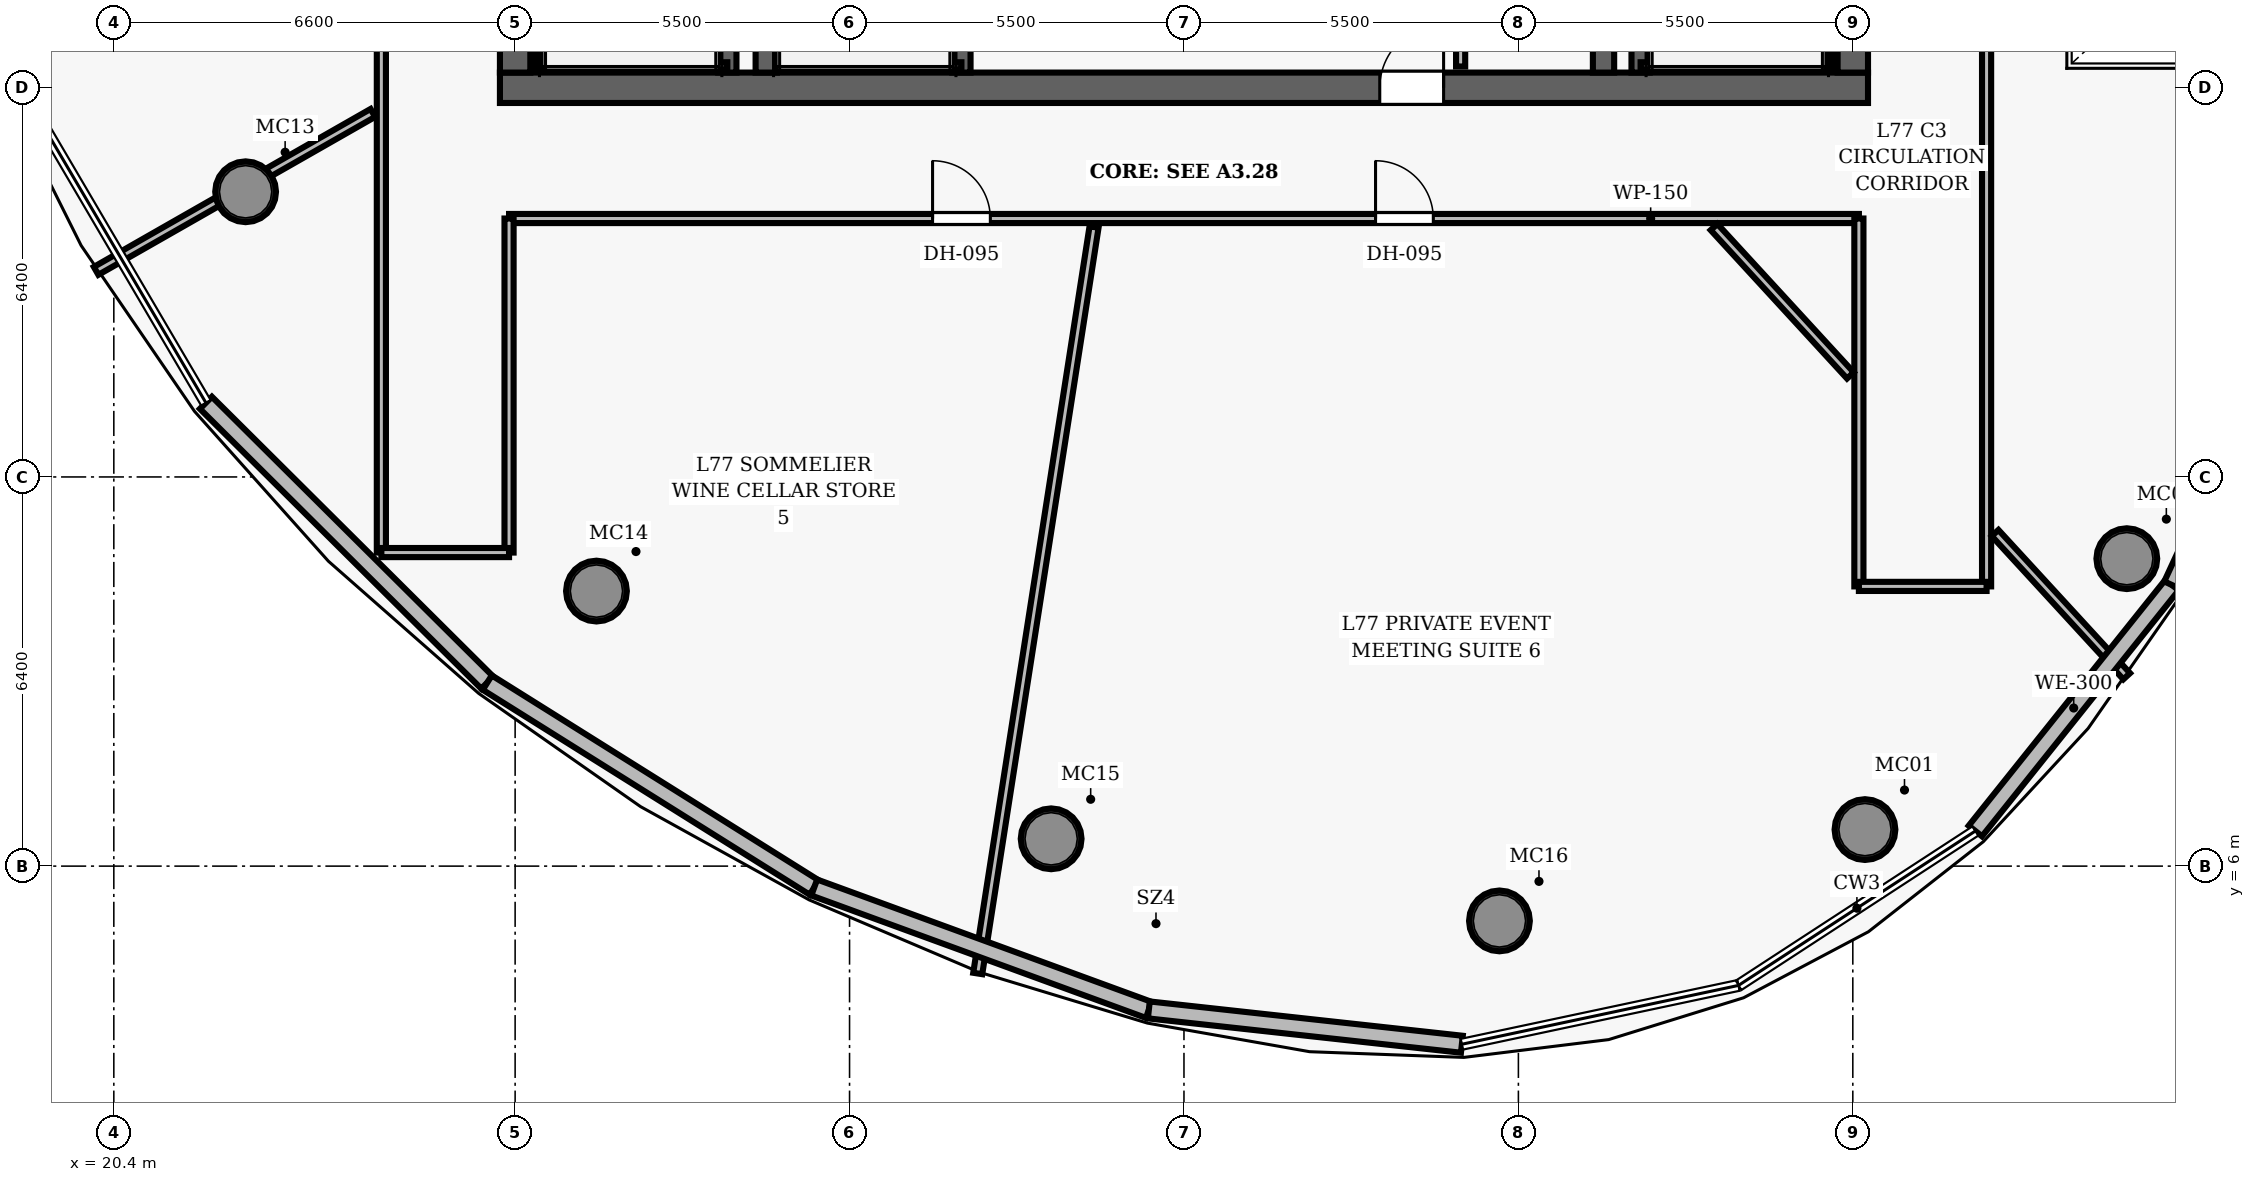
"""IFC4 building model, lengths in metres.
Left out: names, types, materials, properties, quantities, classifications, styles, units other than length and angle.
Written with IfcOpenShell. Run it as: python <this file> out.ifc"""

import sys

from ifc_helpers import new_model, si_unit, direction, frame, frame_2d, origin, origin_2d, place, context, subcontext, project, spatial, rectangle, hollow_circle, extrude, element, fill, save


model = new_model("IFC4")
c1 = context("Model", 3, precision=1e-05, world=origin(), true_north=direction((0.0, 1.0)))
c2 = subcontext(c1, "Body", "Model", "MODEL_VIEW")
j1 = project(units=[si_unit("LENGTHUNIT", "METRE"), si_unit("PLANEANGLEUNIT", "RADIAN")], contexts=[c1])
p1 = place(None, origin())
s1 = spatial("IfcSite", under=j1, at=p1, CompositionType="ELEMENT")
p2 = place(p1, origin())
s2 = spatial("IfcBuilding", under=s1, at=p2, CompositionType="ELEMENT")
p3 = place(p2, frame((0.0, 0.0, 303.65)))
s3 = spatial("IfcBuildingStorey", under=s2, at=p3, CompositionType="ELEMENT", Elevation=303.65)
p4 = place(p3, frame((26.75, 18.8, 0.0), z_axis=(0.0, 0.0, 1.0), x_axis=(1.0, 0.0, 0.0)))
e1 = element("IfcWall", 1, at=p4, inside=s3, PredefinedType="SHEAR", context=c2, shape_type="SweptSolid", body=[
    extrude(rectangle(XDim=22.5, YDim=0.5, at=frame_2d((11.25, 0.0))), origin(), (0.0, 0.0, 1.0), 3.85),
])
p5 = place(p4, frame((14.47, 0.0, 0.0)))
e2 = element("IfcOpeningElement", 2, at=p5, cuts=e1, PredefinedType="OPENING", context=c2, shape_type="SweptSolid", body=[
    extrude(rectangle(XDim=1.05, YDim=2.15, at=frame_2d((0.525, 1.075))), frame((0.0, 0.26, 0.0), z_axis=(0.0, -1.0, 0.0), x_axis=(1.0, 0.0, 0.0)), (0.0, 0.0, 1.0), 0.52),
])
p6 = place(p3, frame((27.0, 19.05, 0.0), z_axis=(0.0, 0.0, 1.0), x_axis=(0.0, 1.0, 0.0)))
e3 = element("IfcWall", 3, at=p6, inside=s3, PredefinedType="SHEAR", context=c2, shape_type="SweptSolid", body=[
    extrude(rectangle(XDim=13.9, YDim=0.5, at=frame_2d((6.95, 0.0))), origin(), (0.0, 0.0, 1.0), 3.85),
])
p7 = place(p6, frame((8.2, 0.0, 0.0)))
e4 = element("IfcOpeningElement", 4, at=p7, cuts=e3, PredefinedType="OPENING", context=c2, shape_type="SweptSolid", body=[
    extrude(rectangle(XDim=1.05, YDim=2.15, at=frame_2d((0.525, 1.075))), frame((0.0, 0.26, 0.0), z_axis=(0.0, -1.0, 0.0), x_axis=(1.0, 0.0, 0.0)), (0.0, 0.0, 1.0), 0.52),
])
p8 = place(p3, frame((49.0, 19.05, 0.0), z_axis=(0.0, 0.0, 1.0), x_axis=(0.0, 1.0, 0.0)))
e5 = element("IfcWall", 5, at=p8, inside=s3, PredefinedType="SHEAR", context=c2, shape_type="SweptSolid", body=[
    extrude(rectangle(XDim=13.9, YDim=0.5, at=frame_2d((6.95, 0.0))), origin(), (0.0, 0.0, 1.0), 3.85),
])
p9 = place(p8, frame((8.2, 0.0, 0.0)))
e6 = element("IfcOpeningElement", 6, at=p9, cuts=e5, PredefinedType="OPENING", context=c2, shape_type="SweptSolid", body=[
    extrude(rectangle(XDim=1.05, YDim=2.15, at=frame_2d((0.525, 1.075))), frame((0.0, 0.26, 0.0), z_axis=(0.0, -1.0, 0.0), x_axis=(1.0, 0.0, 0.0)), (0.0, 0.0, 1.0), 0.52),
])
for number, where, z_axis, x_axis in (
    (7, (31.13, 19.05, 0.0), (0.0, 0.0, 1.0), (0.0, 1.0, 0.0)),
    (8, (44.9, 19.05, 0.0), (0.0, 0.0, 1.0), (0.0, 1.0, 0.0)),
):
    element("IfcWall", number, at=place(p3, frame(where, z_axis=z_axis, x_axis=x_axis)), inside=s3, PredefinedType="SHEAR", context=c2, shape_type="SweptSolid", body=[
        extrude(rectangle(XDim=13.9, YDim=0.35, at=frame_2d((6.95, 0.0))), origin(), (0.0, 0.0, 1.0), 3.85),
    ])
for number, where, z_axis, x_axis in (
    (9, (49.2, 6.601, 0.0), (0.0, 0.0, 1.0), (1.0, 0.0, 0.0)),
    (10, (53.506, 11.056, 0.0), (0.0, 0.0, 1.0), (1.0, 0.0, 0.0)),
    (11, (22.567, 17.09, 0.0), (0.0, 0.0, 1.0), (1.0, 0.0, 0.0)),
    (12, (28.338, 10.523, 0.0), (0.0, 0.0, 1.0), (1.0, 0.0, 0.0)),
    (13, (35.815, 6.449, 0.0), (0.0, 0.0, 1.0), (1.0, 0.0, 0.0)),
    (14, (43.188, 5.099, 0.0), (0.0, 0.0, 1.0), (1.0, 0.0, 0.0)),
):
    element("IfcColumn", number, at=place(p3, frame(where, z_axis=z_axis, x_axis=x_axis)), inside=s3, PredefinedType="COLUMN", context=c2, shape_type="SweptSolid", body=[
        extrude(hollow_circle(Radius=0.5, WallThickness=0.045, at=origin_2d()), origin(), (0.0, 0.0, 1.0), 3.85),
    ])
p10 = place(p3, frame((30.49, 19.05, 0.0), z_axis=(0.0, 0.0, 1.0), x_axis=(0.0, 1.0, 0.0)))
e15 = element("IfcWall", 15, at=p10, inside=s3, PredefinedType="SHEAR", context=c2, shape_type="SweptSolid", body=[
    extrude(rectangle(XDim=7.5, YDim=0.3, at=frame_2d((3.75, 0.0))), origin(), (0.0, 0.0, 1.0), 3.85),
])
p11 = place(p3, frame((27.395, 19.1, 0.0), z_axis=(0.0, 0.0, 1.0), x_axis=(0.0, 1.0, 0.0)))
e16 = element("IfcWall", 16, at=p11, inside=s3, PredefinedType="SHEAR", context=c2, shape_type="SweptSolid", body=[
    extrude(rectangle(XDim=7.45, YDim=0.12, at=frame_2d((3.725, 0.0))), origin(), (0.0, 0.0, 1.0), 3.85),
])
p12 = place(p3, frame((27.395, 19.16, 0.0), z_axis=(0.0, 0.0, 1.0), x_axis=(1.0, 0.0, 0.0)))
e17 = element("IfcWall", 17, at=p12, inside=s3, PredefinedType="SHEAR", context=c2, shape_type="SweptSolid", body=[
    extrude(rectangle(XDim=3.095, YDim=0.12, at=frame_2d((1.547, 0.0))), origin(), (0.0, 0.0, 1.0), 3.85),
])
p13 = place(p3, frame((45.51, 19.05, 0.0), z_axis=(0.0, 0.0, 1.0), x_axis=(0.0, 1.0, 0.0)))
e18 = element("IfcWall", 18, at=p13, inside=s3, PredefinedType="SHEAR", context=c2, shape_type="SweptSolid", body=[
    extrude(rectangle(XDim=7.5, YDim=0.3, at=frame_2d((3.75, 0.0))), origin(), (0.0, 0.0, 1.0), 3.85),
])
p14 = place(p3, frame((48.605, 19.1, 0.0), z_axis=(0.0, 0.0, 1.0), x_axis=(0.0, 1.0, 0.0)))
e19 = element("IfcWall", 19, at=p14, inside=s3, PredefinedType="SHEAR", context=c2, shape_type="SweptSolid", body=[
    extrude(rectangle(XDim=7.45, YDim=0.12, at=frame_2d((3.725, 0.0))), origin(), (0.0, 0.0, 1.0), 3.85),
])
p15 = place(p3, frame((45.51, 19.16, 0.0), z_axis=(0.0, 0.0, 1.0), x_axis=(1.0, 0.0, 0.0)))
e20 = element("IfcWall", 20, at=p15, inside=s3, PredefinedType="SHEAR", context=c2, shape_type="SweptSolid", body=[
    extrude(rectangle(XDim=3.095, YDim=0.12, at=frame_2d((1.547, 0.0))), origin(), (0.0, 0.0, 1.0), 3.85),
])
p16 = place(p3, frame((34.34, 19.05, 0.0), z_axis=(0.0, 0.0, 1.0), x_axis=(0.0, 1.0, 0.0)))
e21 = element("IfcWall", 21, at=p16, inside=s3, PredefinedType="SHEAR", context=c2, shape_type="SweptSolid", body=[
    extrude(rectangle(XDim=7.5, YDim=0.3, at=frame_2d((3.75, 0.0))), origin(), (0.0, 0.0, 1.0), 3.85),
])
p17 = place(p3, frame((31.3, 19.16, 0.0), z_axis=(0.0, 0.0, 1.0), x_axis=(1.0, 0.0, 0.0)))
e22 = element("IfcWall", 22, at=p17, inside=s3, PredefinedType="SHEAR", context=c2, shape_type="SweptSolid", body=[
    extrude(rectangle(XDim=3.04, YDim=0.12, at=frame_2d((1.52, 0.0))), origin(), (0.0, 0.0, 1.0), 3.85),
])
p18 = place(p3, frame((42.55, 19.15, 0.0), z_axis=(0.0, 0.0, 1.0), x_axis=(0.0, 1.0, 0.0)))
e23 = element("IfcWall", 23, at=p18, inside=s3, PredefinedType="PARTITIONING", context=c2, shape_type="SweptSolid", body=[
    extrude(rectangle(XDim=2.75, YDim=0.15, at=frame_2d((1.375, 0.0))), origin(), (0.0, 0.0, 1.0), 3.015),
])
p19 = place(p18, frame((0.7, 0.0, 0.0)))
e24 = element("IfcOpeningElement", 24, at=p19, cuts=e23, PredefinedType="OPENING", context=c2, shape_type="SweptSolid", body=[
    extrude(rectangle(XDim=0.85, YDim=2.1, at=frame_2d((0.425, 1.05))), frame((0.0, 0.085, 0.0), z_axis=(0.0, -1.0, 0.0), x_axis=(1.0, 0.0, 0.0)), (0.0, 0.0, 1.0), 0.17),
])
p20 = place(p3, frame((26.9, 16.65, 0.0), z_axis=(0.0, 0.0, 1.0), x_axis=(1.0, 0.0, 0.0)))
e25 = element("IfcWall", 25, at=p20, inside=s3, PredefinedType="PARTITIONING", context=c2, shape_type="SweptSolid", body=[
    extrude(rectangle(XDim=22.2, YDim=0.15, at=frame_2d((11.1, 0.0))), origin(), (0.0, 0.0, 1.0), 3.015),
])
p21 = place(p20, frame((6.965, 0.0, 0.0)))
e26 = element("IfcOpeningElement", 26, at=p21, cuts=e25, PredefinedType="OPENING", context=c2, shape_type="SweptSolid", body=[
    extrude(rectangle(XDim=0.95, YDim=2.15, at=frame_2d((0.475, 1.075))), frame((0.0, 0.085, 0.0), z_axis=(0.0, -1.0, 0.0), x_axis=(1.0, 0.0, 0.0)), (0.0, 0.0, 1.0), 0.17),
])
p22 = place(p20, frame((14.251, 0.0, 0.0)))
e27 = element("IfcOpeningElement", 27, at=p22, cuts=e25, PredefinedType="OPENING", context=c2, shape_type="SweptSolid", body=[
    extrude(rectangle(XDim=0.95, YDim=2.15, at=frame_2d((0.475, 1.075))), frame((0.0, 0.085, 0.0), z_axis=(0.0, -1.0, 0.0), x_axis=(1.0, 0.0, 0.0)), (0.0, 0.0, 1.0), 0.17),
])
p23 = place(p3, frame((24.8, 11.156, 0.0), z_axis=(0.0, 0.0, 1.0), x_axis=(0.0, 1.0, 0.0)))
e28 = element("IfcWall", 28, at=p23, inside=s3, PredefinedType="PARTITIONING", context=c2, shape_type="SweptSolid", body=[
    extrude(rectangle(XDim=30.243, YDim=0.15, at=frame_2d((15.122, 0.0))), origin(), (0.0, 0.0, 1.0), 3.015),
])
p24 = place(p23, frame((16.594, 0.0, 0.0)))
e29 = element("IfcOpeningElement", 29, at=p24, cuts=e28, PredefinedType="OPENING", context=c2, shape_type="SweptSolid", body=[
    extrude(rectangle(XDim=0.95, YDim=2.15, at=frame_2d((0.475, 1.075))), frame((0.0, 0.085, 0.0), z_axis=(0.0, -1.0, 0.0), x_axis=(1.0, 0.0, 0.0)), (0.0, 0.0, 1.0), 0.17),
])
p25 = place(p3, frame((26.9, 11.156, 0.0), z_axis=(0.0, 0.0, 1.0), x_axis=(0.0, 1.0, 0.0)))
e30 = element("IfcWall", 30, at=p25, inside=s3, PredefinedType="PARTITIONING", context=c2, shape_type="SweptSolid", body=[
    extrude(rectangle(XDim=5.493, YDim=0.15, at=frame_2d((2.747, 0.0))), origin(), (0.0, 0.0, 1.0), 3.015),
])
p26 = place(p3, frame((24.8, 11.156, 0.0), z_axis=(0.0, 0.0, 1.0), x_axis=(1.0, 0.0, 0.0)))
e31 = element("IfcWall", 31, at=p26, inside=s3, PredefinedType="PARTITIONING", context=c2, shape_type="SweptSolid", body=[
    extrude(rectangle(XDim=2.1, YDim=0.15, at=frame_2d((1.05, 0.0))), origin(), (0.0, 0.0, 1.0), 3.015),
])
p27 = place(p3, frame((51.2, 10.6, 0.0), z_axis=(0.0, 0.0, 1.0), x_axis=(0.0, 1.0, 0.0)))
e32 = element("IfcWall", 32, at=p27, inside=s3, PredefinedType="PARTITIONING", context=c2, shape_type="SweptSolid", body=[
    extrude(rectangle(XDim=30.8, YDim=0.15, at=frame_2d((15.4, 0.0))), origin(), (0.0, 0.0, 1.0), 3.015),
])
p28 = place(p27, frame((18.976, 0.0, 0.0)))
e33 = element("IfcOpeningElement", 33, at=p28, cuts=e32, PredefinedType="OPENING", context=c2, shape_type="SweptSolid", body=[
    extrude(rectangle(XDim=1.5, YDim=2.2, at=frame_2d((0.75, 1.1))), frame((0.0, 0.085, 0.0), z_axis=(0.0, -1.0, 0.0), x_axis=(1.0, 0.0, 0.0)), (0.0, 0.0, 1.0), 0.17),
])
p29 = place(p27, frame((12.135, 0.0, 0.0)))
e34 = element("IfcOpeningElement", 34, at=p29, cuts=e32, PredefinedType="OPENING", context=c2, shape_type="SweptSolid", body=[
    extrude(rectangle(XDim=0.95, YDim=2.15, at=frame_2d((0.475, 1.075))), frame((0.0, 0.085, 0.0), z_axis=(0.0, -1.0, 0.0), x_axis=(1.0, 0.0, 0.0)), (0.0, 0.0, 1.0), 0.17),
])
p30 = place(p3, frame((49.1, 10.6, 0.0), z_axis=(0.0, 0.0, 1.0), x_axis=(0.0, 1.0, 0.0)))
e35 = element("IfcWall", 35, at=p30, inside=s3, PredefinedType="PARTITIONING", context=c2, shape_type="SweptSolid", body=[
    extrude(rectangle(XDim=6.05, YDim=0.15, at=frame_2d((3.025, 0.0))), origin(), (0.0, 0.0, 1.0), 3.015),
])
p31 = place(p3, frame((49.1, 10.6, 0.0), z_axis=(0.0, 0.0, 1.0), x_axis=(1.0, 0.0, 0.0)))
e36 = element("IfcWall", 36, at=p31, inside=s3, PredefinedType="PARTITIONING", context=c2, shape_type="SweptSolid", body=[
    extrude(rectangle(XDim=2.1, YDim=0.15, at=frame_2d((1.05, 0.0))), origin(), (0.0, 0.0, 1.0), 3.015),
])
p32 = place(p3, frame((24.66, 18.387, 0.0), z_axis=(0.0, 0.0, 1.0), x_axis=(-0.868495322336, -0.495697362389, 0.0)))
e37 = element("IfcWall", 37, at=p32, inside=s3, PredefinedType="PARTITIONING", context=c2, shape_type="SweptSolid", body=[
    extrude(rectangle(XDim=5.24, YDim=0.15, at=frame_2d((2.62, 0.0))), origin(), (0.0, 0.0, 1.0), 3.015),
])
p33 = place(p3, frame((36.521, 16.51, 0.0), z_axis=(0.0, 0.0, 1.0), x_axis=(-0.15396623611, -0.988076109487, 0.0)))
e38 = element("IfcWall", 38, at=p33, inside=s3, PredefinedType="PARTITIONING", context=c2, shape_type="SweptSolid", body=[
    extrude(rectangle(XDim=12.424, YDim=0.15, at=frame_2d((6.212, 0.0))), origin(), (0.0, 0.0, 1.0), 3.015),
])
p34 = place(p3, frame((46.718, 16.51, 0.0), z_axis=(0.0, 0.0, 1.0), x_axis=(0.676491436153, -0.736450498548, 0.0)))
e39 = element("IfcWall", 39, at=p34, inside=s3, PredefinedType="PARTITIONING", context=c2, shape_type="SweptSolid", body=[
    extrude(rectangle(XDim=3.314, YDim=0.15, at=frame_2d((1.657, 0.0))), origin(), (0.0, 0.0, 1.0), 3.015),
])
p35 = place(p3, frame((51.34, 11.478, 0.0), z_axis=(0.0, 0.0, 1.0), x_axis=(0.676515680842, -0.736428227036, 0.0)))
e40 = element("IfcWall", 40, at=p35, inside=s3, PredefinedType="PARTITIONING", context=c2, shape_type="SweptSolid", body=[
    extrude(rectangle(XDim=3.199, YDim=0.15, at=frame_2d((1.599, 0.0))), origin(), (0.0, 0.0, 1.0), 3.015),
])
p36 = place(p3, frame((54.25, 10.623, 0.0), z_axis=(0.0, 0.0, 1.0), x_axis=(-0.624465086055, -0.781052723123, 0.0)))
e41 = element("IfcWall", 41, at=p36, inside=s3, PredefinedType="SOLIDWALL", context=c2, shape_type="SweptSolid", body=[
    extrude(rectangle(XDim=5.179, YDim=0.28, at=frame_2d((2.59, 0.0))), origin(), (0.0, 0.0, 1.0), 3.6),
])
p37 = place(p3, frame((56.708, 15.942, 0.0), z_axis=(0.0, 0.0, 1.0), x_axis=(-0.419589157981, -0.907714128184, 0.0)))
e42 = element("IfcWall", 42, at=p37, inside=s3, PredefinedType="SOLIDWALL", context=c2, shape_type="SweptSolid", body=[
    extrude(rectangle(XDim=5.86, YDim=0.28, at=frame_2d((2.93, 0.0))), origin(), (0.0, 0.0, 1.0), 3.6),
])
p38 = place(p3, frame((26.542, 9.018, 0.0), z_axis=(0.0, 0.0, 1.0), x_axis=(-0.709068075652, 0.705140031548, 0.0)))
e43 = element("IfcWall", 43, at=p38, inside=s3, PredefinedType="SOLIDWALL", context=c2, shape_type="SweptSolid", body=[
    extrude(rectangle(XDim=6.526, YDim=0.28, at=frame_2d((3.263, 0.0))), origin(), (0.0, 0.0, 1.0), 3.6),
])
p39 = place(p3, frame((31.919, 5.648, 0.0), z_axis=(0.0, 0.0, 1.0), x_axis=(-0.847381664832, 0.530984288003, 0.0)))
e44 = element("IfcWall", 44, at=p39, inside=s3, PredefinedType="SOLIDWALL", context=c2, shape_type="SweptSolid", body=[
    extrude(rectangle(XDim=6.345, YDim=0.28, at=frame_2d((3.172, 0.0))), origin(), (0.0, 0.0, 1.0), 3.6),
])
p40 = place(p3, frame((37.422, 3.635, 0.0), z_axis=(0.0, 0.0, 1.0), x_axis=(-0.939137277683, 0.343542098828, 0.0)))
e45 = element("IfcWall", 45, at=p40, inside=s3, PredefinedType="SOLIDWALL", context=c2, shape_type="SweptSolid", body=[
    extrude(rectangle(XDim=5.86, YDim=0.28, at=frame_2d((2.93, 0.0))), origin(), (0.0, 0.0, 1.0), 3.6),
])
p41 = place(p3, frame((42.571, 3.071, 0.0), z_axis=(0.0, 0.0, 1.0), x_axis=(-0.994043637574, 0.108982781206, 0.0)))
e46 = element("IfcWall", 46, at=p41, inside=s3, PredefinedType="SOLIDWALL", context=c2, shape_type="SweptSolid", body=[
    extrude(rectangle(XDim=5.179, YDim=0.28, at=frame_2d((2.59, 0.0))), origin(), (0.0, 0.0, 1.0), 3.6),
])
p42 = place(p5, origin())
e47 = element("IfcDoor", 47, at=p42, inside=s3, OperationType="SINGLE_SWING_RIGHT", PredefinedType="DOOR", context=c2, shape_type="SweptSolid", body=[
    extrude(rectangle(XDim=1.05, YDim=2.15, at=frame_2d((0.525, 1.075))), frame((0.0, 0.025, 0.0), z_axis=(0.0, -1.0, 0.0), x_axis=(1.0, 0.0, 0.0)), (0.0, 0.0, 1.0), 0.05),
])
fill(e2, e47)
p43 = place(p21, origin())
e48 = element("IfcDoor", 48, at=p43, inside=s3, OperationType="SINGLE_SWING_LEFT", PredefinedType="DOOR", context=c2, shape_type="SweptSolid", body=[
    extrude(rectangle(XDim=0.95, YDim=2.15, at=frame_2d((0.475, 1.075))), frame((0.0, 0.025, 0.0), z_axis=(0.0, -1.0, 0.0), x_axis=(1.0, 0.0, 0.0)), (0.0, 0.0, 1.0), 0.05),
])
fill(e26, e48)
p44 = place(p22, origin())
e49 = element("IfcDoor", 49, at=p44, inside=s3, OperationType="SINGLE_SWING_LEFT", PredefinedType="DOOR", context=c2, shape_type="SweptSolid", body=[
    extrude(rectangle(XDim=0.95, YDim=2.15, at=frame_2d((0.475, 1.075))), frame((0.0, 0.025, 0.0), z_axis=(0.0, -1.0, 0.0), x_axis=(1.0, 0.0, 0.0)), (0.0, 0.0, 1.0), 0.05),
])
fill(e27, e49)
save(model, sys.argv[1])
